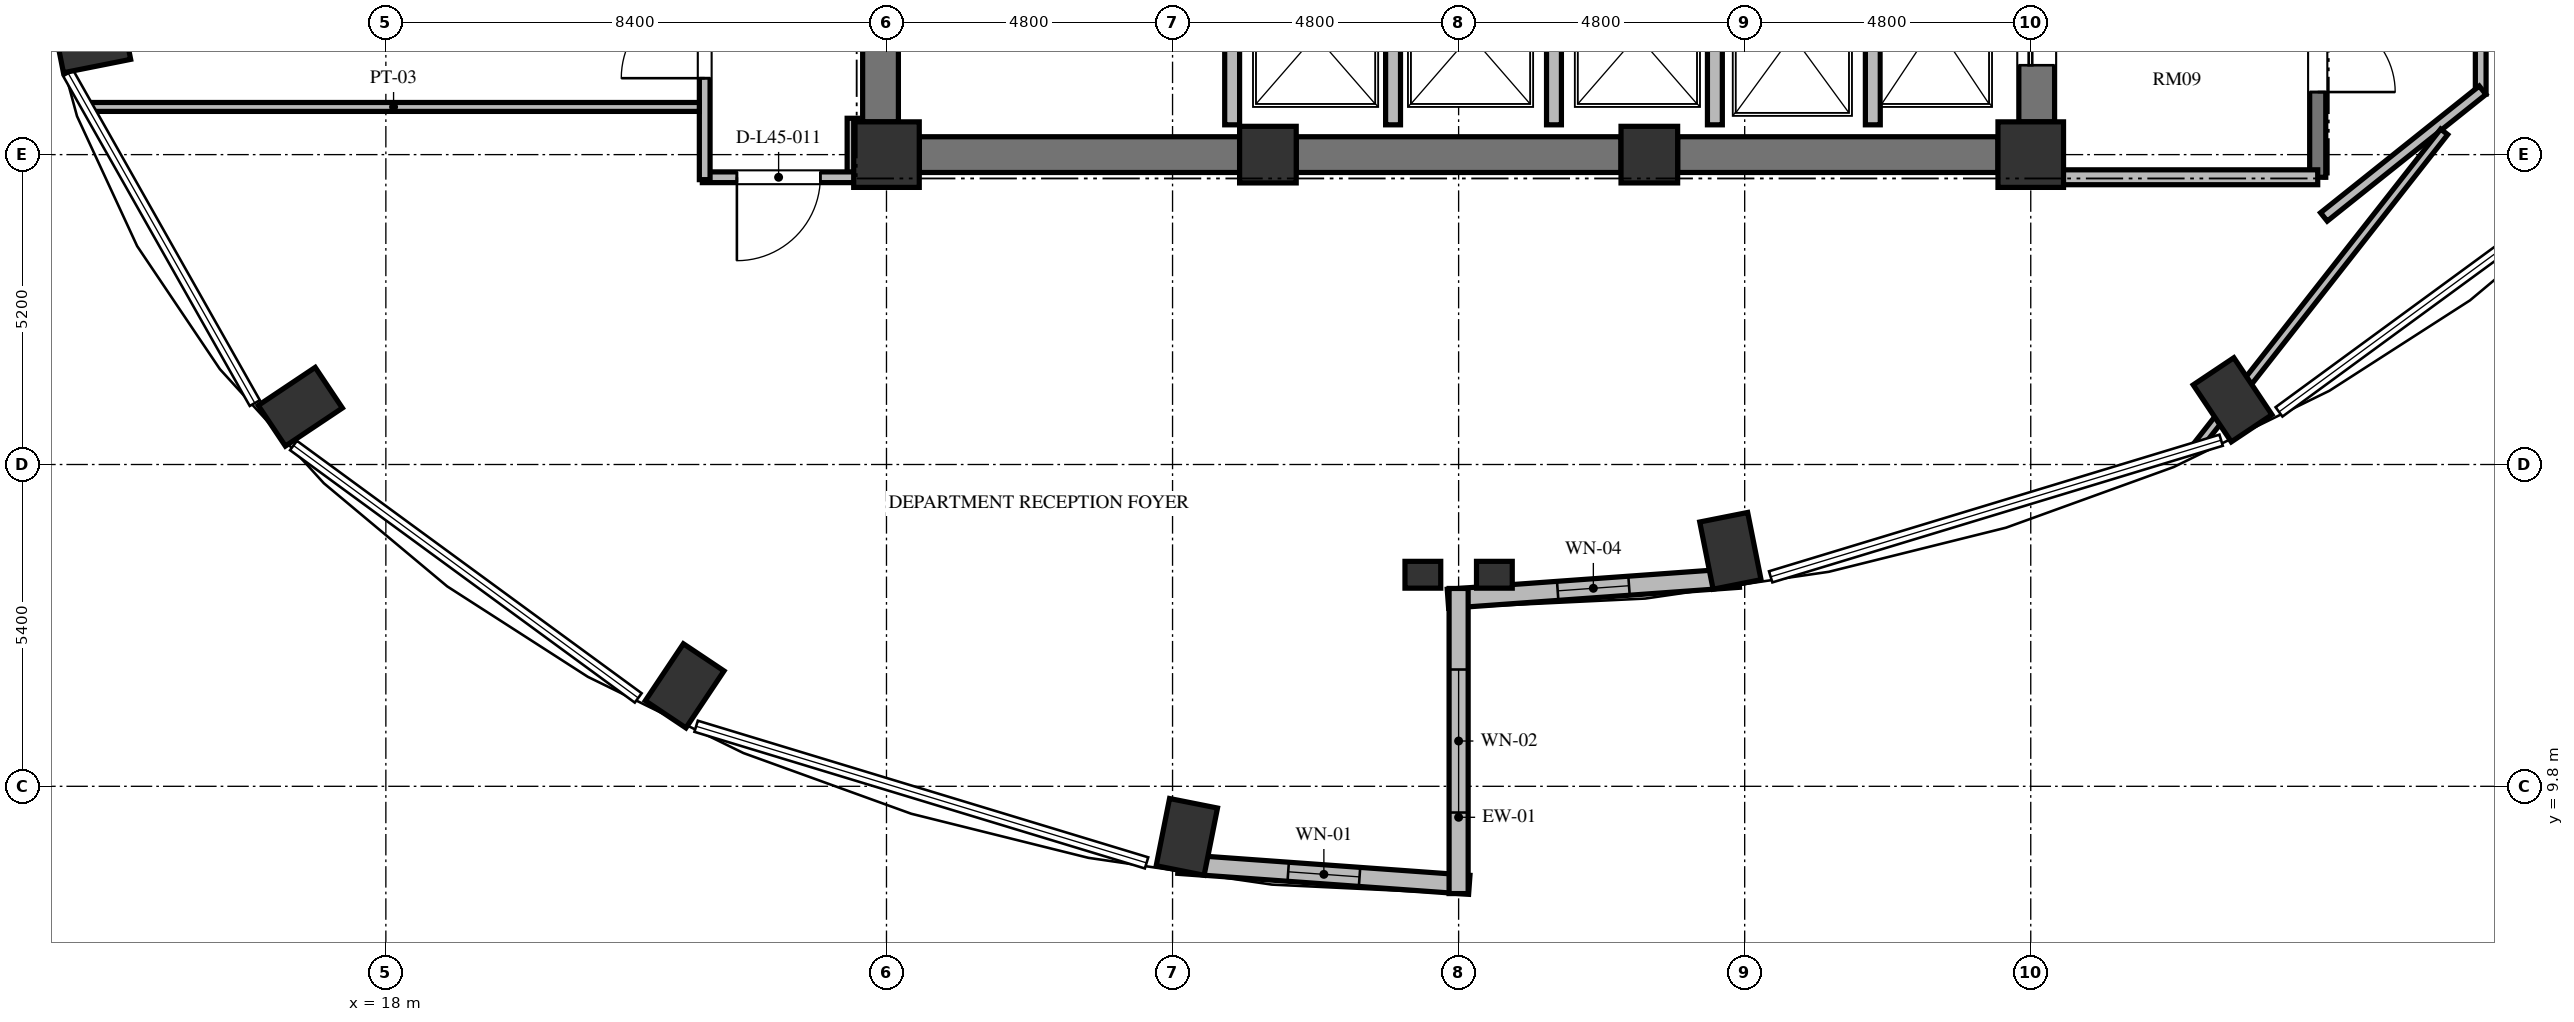
"""IFC4 building model, lengths in metres.
Left out: names, types, materials, properties, quantities, classifications, styles, units other than length and angle.
Written with IfcOpenShell. Run it as: python <this file> out.ifc"""

import sys

from ifc_helpers import new_model, si_unit, direction, frame, frame_2d, origin, origin_2d, place, context, subcontext, project, spatial, rectangle, extrude, element, fill, save


model = new_model("IFC4")
c1 = context("Model", 3, precision=1e-05, world=origin(), true_north=direction((0.0, 1.0)))
c2 = subcontext(c1, "Body", "Model", "MODEL_VIEW")
j1 = project(units=[si_unit("LENGTHUNIT", "METRE"), si_unit("PLANEANGLEUNIT", "RADIAN")], contexts=[c1])
p1 = place(None, origin())
s1 = spatial("IfcSite", under=j1, at=p1, CompositionType="ELEMENT")
p2 = place(p1, origin())
s2 = spatial("IfcBuilding", under=s1, at=p2, CompositionType="ELEMENT")
p3 = place(p2, frame((0.0, 0.0, 174.768)))
s3 = spatial("IfcBuildingStorey", under=s2, at=p3, CompositionType="ELEMENT", Elevation=174.768)
for number, where, z_axis, x_axis in (
    (1, (40.56, 13.751, 0.0), (0.0, 0.0, 1.0), (0.195, -0.981, 0.0)),
    (2, (48.987, 16.286, 0.0), (0.0, 0.0, 1.0), (0.556, -0.831, 0.0)),
    (3, (13.074, 22.288, 0.0), (0.0, 0.0, 1.0), (-0.981, -0.195, 0.0)),
    (4, (16.564, 16.169, 0.0), (0.0, 0.0, 1.0), (-0.831, -0.556, 0.0)),
    (5, (23.013, 11.486, 0.0), (0.0, 0.0, 1.0), (-0.556, -0.831, 0.0)),
    (6, (31.44, 8.951, 0.0), (0.0, 0.0, 1.0), (-0.195, -0.981, 0.0)),
):
    element("IfcColumn", number, at=place(p3, frame(where, z_axis=z_axis, x_axis=x_axis)), inside=s3, PredefinedType="COLUMN", context=c2, shape_type="SweptSolid", body=[
        extrude(rectangle(XDim=1.15, YDim=0.82, at=origin_2d()), origin(), (0.0, 0.0, 1.0), 3.648),
    ])
p4 = place(p3, frame((26.4, 20.4, 0.0), z_axis=(0.0, 0.0, 1.0), x_axis=(1.0, 0.0, 0.0)))
e7 = element("IfcColumn", 7, at=p4, inside=s3, PredefinedType="COLUMN", context=c2, shape_type="SweptSolid", body=[
    extrude(rectangle(XDim=1.1, YDim=1.1, at=origin_2d()), origin(), (0.0, 0.0, 1.0), 3.648),
])
for number, where, z_axis, x_axis in (
    (8, (32.8, 20.4, 0.0), (0.0, 0.0, 1.0), (1.0, 0.0, 0.0)),
    (9, (39.2, 20.4, 0.0), (0.0, 0.0, 1.0), (1.0, 0.0, 0.0)),
):
    element("IfcColumn", number, at=place(p3, frame(where, z_axis=z_axis, x_axis=x_axis)), inside=s3, PredefinedType="COLUMN", context=c2, shape_type="SweptSolid", body=[
        extrude(rectangle(XDim=0.95, YDim=0.95, at=origin_2d()), origin(), (0.0, 0.0, 1.0), 3.648),
    ])
p5 = place(p3, frame((45.6, 20.4, 0.0), z_axis=(0.0, 0.0, 1.0), x_axis=(1.0, 0.0, 0.0)))
e10 = element("IfcColumn", 10, at=p5, inside=s3, PredefinedType="COLUMN", context=c2, shape_type="SweptSolid", body=[
    extrude(rectangle(XDim=1.1, YDim=1.1, at=origin_2d()), origin(), (0.0, 0.0, 1.0), 3.648),
])
for number, where, z_axis, x_axis in (
    (11, (35.4, 13.35, 0.0), (0.0, 0.0, 1.0), (1.0, 0.0, 0.0)),
    (12, (36.6, 13.35, 0.0), (0.0, 0.0, 1.0), (1.0, 0.0, 0.0)),
):
    element("IfcColumn", number, at=place(p3, frame(where, z_axis=z_axis, x_axis=x_axis)), inside=s3, PredefinedType="PILASTER", context=c2, shape_type="SweptSolid", body=[
        extrude(rectangle(XDim=0.6, YDim=0.45, at=origin_2d()), origin(), (0.0, 0.0, 1.0), 3.648),
    ])
p6 = place(p3, frame((26.3, 20.95, 0.0), z_axis=(0.0, 0.0, 1.0), x_axis=(0.0, 1.0, 0.0)))
e13 = element("IfcWall", 13, at=p6, inside=s3, PredefinedType="SHEAR", context=c2, shape_type="SweptSolid", body=[
    extrude(rectangle(XDim=14.1, YDim=0.6, at=frame_2d((7.05, 0.0))), origin(), (0.0, 0.0, 1.0), 3.648),
])
p7 = place(p6, frame((6.5, 0.0, 0.0)))
e14 = element("IfcOpeningElement", 14, at=p7, cuts=e13, PredefinedType="OPENING", context=c2, shape_type="SweptSolid", body=[
    extrude(rectangle(XDim=1.2, YDim=2.15, at=frame_2d((0.6, 1.075))), frame((0.0, 0.31, 0.0), z_axis=(0.0, -1.0, 0.0), x_axis=(1.0, 0.0, 0.0)), (0.0, 0.0, 1.0), 0.62),
])
p8 = place(p6, frame((9.6, 0.0, 0.0)))
e15 = element("IfcOpeningElement", 15, at=p8, cuts=e13, PredefinedType="OPENING", context=c2, shape_type="SweptSolid", body=[
    extrude(rectangle(XDim=1.3, YDim=2.2, at=frame_2d((0.65, 1.1))), frame((0.0, 0.31, 0.0), z_axis=(0.0, -1.0, 0.0), x_axis=(1.0, 0.0, 0.0)), (0.0, 0.0, 1.0), 0.62),
])
p9 = place(p6, frame((3.26, 0.0, 0.0)))
e16 = element("IfcOpeningElement", 16, at=p9, cuts=e13, PredefinedType="OPENING", context=c2, shape_type="SweptSolid", body=[
    extrude(rectangle(XDim=1.3, YDim=2.2, at=frame_2d((0.65, 1.1))), frame((0.0, 0.31, 0.0), z_axis=(0.0, -1.0, 0.0), x_axis=(1.0, 0.0, 0.0)), (0.0, 0.0, 1.0), 0.62),
])
p10 = place(p3, frame((45.7, 20.95, 0.0), z_axis=(0.0, 0.0, 1.0), x_axis=(0.0, 1.0, 0.0)))
e17 = element("IfcWall", 17, at=p10, inside=s3, PredefinedType="SHEAR", context=c2, shape_type="SweptSolid", body=[
    extrude(rectangle(XDim=14.1, YDim=0.6, at=frame_2d((7.05, 0.0))), origin(), (0.0, 0.0, 1.0), 3.648),
])
p11 = place(p10, frame((11.75, 0.0, 0.0)))
e18 = element("IfcOpeningElement", 18, at=p11, cuts=e17, PredefinedType="OPENING", context=c2, shape_type="SweptSolid", body=[
    extrude(rectangle(XDim=1.4, YDim=2.3, at=frame_2d((0.7, 1.15))), frame((0.0, 0.31, 0.0), z_axis=(0.0, -1.0, 0.0), x_axis=(1.0, 0.0, 0.0)), (0.0, 0.0, 1.0), 0.62),
])
p12 = place(p10, frame((0.95, 0.0, 0.0)))
e19 = element("IfcOpeningElement", 19, at=p12, cuts=e17, PredefinedType="OPENING", context=c2, shape_type="SweptSolid", body=[
    extrude(rectangle(XDim=1.4, YDim=2.3, at=frame_2d((0.7, 1.15))), frame((0.0, 0.31, 0.0), z_axis=(0.0, -1.0, 0.0), x_axis=(1.0, 0.0, 0.0)), (0.0, 0.0, 1.0), 0.62),
])
p13 = place(p3, frame((26.95, 20.4, 0.0), z_axis=(0.0, 0.0, 1.0), x_axis=(1.0, 0.0, 0.0)))
e20 = element("IfcWall", 20, at=p13, inside=s3, PredefinedType="SHEAR", context=c2, shape_type="SweptSolid", body=[
    extrude(rectangle(XDim=5.375, YDim=0.6, at=frame_2d((2.688, 0.0))), origin(), (0.0, 0.0, 1.0), 3.648),
])
p14 = place(p3, frame((33.275, 20.4, 0.0), z_axis=(0.0, 0.0, 1.0), x_axis=(1.0, 0.0, 0.0)))
e21 = element("IfcWall", 21, at=p14, inside=s3, PredefinedType="SHEAR", context=c2, shape_type="SweptSolid", body=[
    extrude(rectangle(XDim=5.45, YDim=0.6, at=frame_2d((2.725, 0.0))), origin(), (0.0, 0.0, 1.0), 3.648),
])
p15 = place(p3, frame((39.675, 20.4, 0.0), z_axis=(0.0, 0.0, 1.0), x_axis=(1.0, 0.0, 0.0)))
e22 = element("IfcWall", 22, at=p15, inside=s3, PredefinedType="SHEAR", context=c2, shape_type="SweptSolid", body=[
    extrude(rectangle(XDim=5.375, YDim=0.6, at=frame_2d((2.688, 0.0))), origin(), (0.0, 0.0, 1.0), 3.648),
])
p16 = place(p3, frame((35.821, 12.947, 0.0), z_axis=(0.0, 0.0, 1.0), x_axis=(0.997415460462, 0.071849838072, 0.0)))
e23 = element("IfcWall", 23, at=p16, inside=s3, PredefinedType="SOLIDWALL", context=c2, shape_type="SweptSolid", body=[
    extrude(rectangle(XDim=4.893, YDim=0.32, at=frame_2d((2.447, 0.0))), origin(), (0.0, 0.0, 1.0), 3.428),
])
p17 = place(p16, frame((1.846, 0.0, 0.85)))
e24 = element("IfcOpeningElement", 24, at=p17, cuts=e23, PredefinedType="OPENING", context=c2, shape_type="SweptSolid", body=[
    extrude(rectangle(XDim=1.2, YDim=1.8, at=frame_2d((0.6, 0.9))), frame((0.0, 0.17, 0.0), z_axis=(0.0, -1.0, 0.0), x_axis=(1.0, 0.0, 0.0)), (0.0, 0.0, 1.0), 0.34),
])
p18 = place(p3, frame((31.299, 8.499, 0.0), z_axis=(0.0, 0.0, 1.0), x_axis=(0.997415202861, -0.071853413984, 0.0)))
e25 = element("IfcWall", 25, at=p18, inside=s3, PredefinedType="SOLIDWALL", context=c2, shape_type="SweptSolid", body=[
    extrude(rectangle(XDim=4.893, YDim=0.32, at=frame_2d((2.446, 0.0))), origin(), (0.0, 0.0, 1.0), 3.428),
])
p19 = place(p18, frame((1.846, 0.0, 0.85)))
e26 = element("IfcOpeningElement", 26, at=p19, cuts=e25, PredefinedType="OPENING", context=c2, shape_type="SweptSolid", body=[
    extrude(rectangle(XDim=1.2, YDim=2.2, at=frame_2d((0.6, 1.1))), frame((0.0, 0.17, 0.0), z_axis=(0.0, -1.0, 0.0), x_axis=(1.0, 0.0, 0.0)), (0.0, 0.0, 1.0), 0.34),
])
p20 = place(p3, frame((36.0, 8.0, 0.0), z_axis=(0.0, 0.0, 1.0), x_axis=(0.0, 1.0, 0.0)))
e27 = element("IfcWall", 27, at=p20, inside=s3, PredefinedType="SOLIDWALL", context=c2, shape_type="SweptSolid", body=[
    extrude(rectangle(XDim=5.12, YDim=0.32, at=frame_2d((2.56, 0.0))), origin(), (0.0, 0.0, 1.0), 3.428),
])
p21 = place(p20, frame((1.36, 0.0, 0.84)))
e28 = element("IfcOpeningElement", 28, at=p21, cuts=e27, PredefinedType="OPENING", context=c2, shape_type="SweptSolid", body=[
    extrude(rectangle(XDim=2.4, YDim=2.04, at=frame_2d((1.2, 1.02))), frame((0.0, 0.17, 0.0), z_axis=(0.0, -1.0, 0.0), x_axis=(1.0, 0.0, 0.0)), (0.0, 0.0, 1.0), 0.34),
])
p22 = place(p3, frame((42.95, 20.9, 0.0), z_axis=(0.0, 0.0, 1.0), x_axis=(0.0, 1.0, 0.0)))
e29 = element("IfcWall", 29, at=p22, inside=s3, PredefinedType="SOLIDWALL", context=c2, shape_type="SweptSolid", body=[
    extrude(rectangle(XDim=3.2, YDim=0.25, at=frame_2d((1.6, 0.0))), origin(), (0.0, 0.0, 1.0), 3.428),
])
for number, where, z_axis, x_axis in (
    (30, (32.2, 20.9, 0.0), (0.0, 0.0, 1.0), (0.0, 1.0, 0.0)),
    (31, (34.9, 20.9, 0.0), (0.0, 0.0, 1.0), (0.0, 1.0, 0.0)),
    (32, (37.6, 20.9, 0.0), (0.0, 0.0, 1.0), (0.0, 1.0, 0.0)),
    (33, (40.3, 20.9, 0.0), (0.0, 0.0, 1.0), (0.0, 1.0, 0.0)),
):
    element("IfcWall", number, at=place(p3, frame(where, z_axis=z_axis, x_axis=x_axis)), inside=s3, PredefinedType="SOLIDWALL", context=c2, shape_type="SweptSolid", body=[
        extrude(rectangle(XDim=2.8, YDim=0.25, at=frame_2d((1.4, 0.0))), origin(), (0.0, 0.0, 1.0), 3.428),
    ])
p23 = place(p3, frame((50.415, 35.845, 0.0), z_axis=(0.0, 0.0, 1.0), x_axis=(0.0, -1.0, 0.0)))
e34 = element("IfcWall", 34, at=p23, inside=s3, PredefinedType="SHEAR", context=c2, shape_type="SweptSolid", body=[
    extrude(rectangle(XDim=15.825, YDim=0.27, at=frame_2d((7.913, 0.0))), origin(), (0.0, 0.0, 1.0), 3.648),
])
p24 = place(p23, frame((4.445, 0.0, 0.0)))
e35 = element("IfcOpeningElement", 35, at=p24, cuts=e34, PredefinedType="OPENING", context=c2, shape_type="SweptSolid", body=[
    extrude(rectangle(XDim=1.2, YDim=2.15, at=frame_2d((0.6, 1.075))), frame((0.0, 0.145, 0.0), z_axis=(0.0, -1.0, 0.0), x_axis=(1.0, 0.0, 0.0)), (0.0, 0.0, 1.0), 0.29),
])
p25 = place(p23, frame((1.295, 0.0, 0.0)))
e36 = element("IfcOpeningElement", 36, at=p25, cuts=e34, PredefinedType="OPENING", context=c2, shape_type="SweptSolid", body=[
    extrude(rectangle(XDim=1.3, YDim=2.2, at=frame_2d((0.65, 1.1))), frame((0.0, 0.145, 0.0), z_axis=(0.0, -1.0, 0.0), x_axis=(1.0, 0.0, 0.0)), (0.0, 0.0, 1.0), 0.29),
])
p26 = place(p23, frame((13.095, 0.0, 0.0)))
e37 = element("IfcOpeningElement", 37, at=p26, cuts=e34, PredefinedType="OPENING", context=c2, shape_type="SweptSolid", body=[
    extrude(rectangle(XDim=1.3, YDim=2.2, at=frame_2d((0.65, 1.1))), frame((0.0, 0.145, 0.0), z_axis=(0.0, -1.0, 0.0), x_axis=(1.0, 0.0, 0.0)), (0.0, 0.0, 1.0), 0.29),
])
p27 = place(p3, frame((45.7, 20.02, 0.0), z_axis=(0.0, 0.0, 1.0), x_axis=(1.0, 0.0, 0.0)))
e38 = element("IfcWall", 38, at=p27, inside=s3, PredefinedType="SOLIDWALL", context=c2, shape_type="SweptSolid", body=[
    extrude(rectangle(XDim=4.715, YDim=0.25, at=frame_2d((2.357, 0.0))), origin(), (0.0, 0.0, 1.0), 3.428),
])
p28 = place(p3, frame((53.15, 38.79, 0.0), z_axis=(0.0, 0.0, 1.0), x_axis=(0.0, -1.0, 0.0)))
e39 = element("IfcWall", 39, at=p28, inside=s3, PredefinedType="PARTITIONING", context=c2, shape_type="SweptSolid", body=[
    extrude(rectangle(XDim=17.374, YDim=0.18, at=frame_2d((8.687, 0.0))), origin(), (0.0, 0.0, 1.0), 3.428),
])
p29 = place(p28, frame((8.162, 0.0, 0.0)))
e40 = element("IfcOpeningElement", 40, at=p29, cuts=e39, PredefinedType="OPENING", context=c2, shape_type="SweptSolid", body=[
    extrude(rectangle(XDim=1.05, YDim=2.15, at=frame_2d((0.525, 1.075))), frame((0.0, 0.1, 0.0), z_axis=(0.0, -1.0, 0.0), x_axis=(1.0, 0.0, 0.0)), (0.0, 0.0, 1.0), 0.2),
])
p30 = place(p3, frame((53.181, 21.481, 0.0), z_axis=(0.0, 0.0, 1.0), x_axis=(-0.781420737726, -0.624004511724, 0.0)))
e41 = element("IfcWall", 41, at=p30, inside=s3, PredefinedType="PARTITIONING", context=c2, shape_type="SweptSolid", body=[
    extrude(rectangle(XDim=3.407, YDim=0.18, at=frame_2d((1.704, 0.0))), origin(), (0.0, 0.0, 1.0), 3.428),
])
p31 = place(p3, frame((25.83, 21.01, 0.0), z_axis=(0.0, 0.0, 1.0), x_axis=(0.0, -1.0, 0.0)))
e42 = element("IfcWall", 42, at=p31, inside=s3, PredefinedType="PARTITIONING", context=c2, shape_type="SweptSolid", body=[
    extrude(rectangle(XDim=1.03, YDim=0.18, at=frame_2d((0.515, 0.0))), origin(), (0.0, 0.0, 1.0), 3.428),
])
p32 = place(p3, frame((25.87, 20.02, 0.0), z_axis=(0.0, 0.0, 1.0), x_axis=(-1.0, 0.0, 0.0)))
e43 = element("IfcWall", 43, at=p32, inside=s3, PredefinedType="PARTITIONING", context=c2, shape_type="SweptSolid", body=[
    extrude(rectangle(XDim=2.56, YDim=0.18, at=frame_2d((1.28, 0.0))), origin(), (0.0, 0.0, 1.0), 3.428),
])
p33 = place(p32, frame((0.58, 0.0, 0.0)))
e44 = element("IfcOpeningElement", 44, at=p33, cuts=e43, PredefinedType="OPENING", context=c2, shape_type="SweptSolid", body=[
    extrude(rectangle(XDim=1.4, YDim=2.2, at=frame_2d((0.7, 1.1))), frame((0.0, 0.1, 0.0), z_axis=(0.0, -1.0, 0.0), x_axis=(1.0, 0.0, 0.0)), (0.0, 0.0, 1.0), 0.2),
])
p34 = place(p3, frame((23.35, 19.98, 0.0), z_axis=(0.0, 0.0, 1.0), x_axis=(0.0, 1.0, 0.0)))
e45 = element("IfcWall", 45, at=p34, inside=s3, PredefinedType="PARTITIONING", context=c2, shape_type="SweptSolid", body=[
    extrude(rectangle(XDim=5.06, YDim=0.18, at=frame_2d((2.53, 0.0))), origin(), (0.0, 0.0, 1.0), 3.428),
])
p35 = place(p34, frame((1.702, 0.0, 0.0)))
e46 = element("IfcOpeningElement", 46, at=p35, cuts=e45, PredefinedType="OPENING", context=c2, shape_type="SweptSolid", body=[
    extrude(rectangle(XDim=1.4, YDim=2.2, at=frame_2d((0.7, 1.1))), frame((0.0, 0.1, 0.0), z_axis=(0.0, -1.0, 0.0), x_axis=(1.0, 0.0, 0.0)), (0.0, 0.0, 1.0), 0.2),
])
p36 = place(p3, frame((12.999, 21.2, 0.0), z_axis=(0.0, 0.0, 1.0), x_axis=(1.0, 0.0, 0.0)))
e47 = element("IfcWall", 47, at=p36, inside=s3, PredefinedType="PARTITIONING", context=c2, shape_type="SweptSolid", body=[
    extrude(rectangle(XDim=10.261, YDim=0.15, at=frame_2d((5.131, 0.0))), origin(), (0.0, 0.0, 1.0), 2.863),
])
p37 = place(p3, frame((52.537, 20.783, 0.0), z_axis=(0.0, 0.0, 1.0), x_axis=(-0.617570357244, -0.786515641201, 0.0)))
e48 = element("IfcWall", 48, at=p37, inside=s3, PredefinedType="PARTITIONING", context=c2, shape_type="SweptSolid", body=[
    extrude(rectangle(XDim=6.74, YDim=0.15, at=frame_2d((3.37, 0.0))), origin(), (0.0, 0.0, 1.0), 2.863),
])
p38 = place(p17, origin())
e49 = element("IfcWindow", 49, at=p38, inside=s3, PartitioningType="SINGLE_PANEL", PredefinedType="WINDOW", context=c2, shape_type="SweptSolid", body=[
    extrude(rectangle(XDim=1.2, YDim=1.8, at=frame_2d((0.6, 0.9))), frame((0.0, 0.03, 0.0), z_axis=(0.0, -1.0, 0.0), x_axis=(1.0, 0.0, 0.0)), (0.0, 0.0, 1.0), 0.06),
])
fill(e24, e49)
p39 = place(p19, origin())
e50 = element("IfcWindow", 50, at=p39, inside=s3, PartitioningType="SINGLE_PANEL", PredefinedType="WINDOW", context=c2, shape_type="SweptSolid", body=[
    extrude(rectangle(XDim=1.2, YDim=2.2, at=frame_2d((0.6, 1.1))), frame((0.0, 0.03, 0.0), z_axis=(0.0, -1.0, 0.0), x_axis=(1.0, 0.0, 0.0)), (0.0, 0.0, 1.0), 0.06),
])
fill(e26, e50)
p40 = place(p21, origin())
e51 = element("IfcWindow", 51, at=p40, inside=s3, PartitioningType="SINGLE_PANEL", PredefinedType="WINDOW", context=c2, shape_type="SweptSolid", body=[
    extrude(rectangle(XDim=2.4, YDim=2.04, at=frame_2d((1.2, 1.02))), frame((0.0, 0.03, 0.0), z_axis=(0.0, -1.0, 0.0), x_axis=(1.0, 0.0, 0.0)), (0.0, 0.0, 1.0), 0.06),
])
fill(e28, e51)
p41 = place(p12, origin())
e52 = element("IfcDoor", 52, at=p41, inside=s3, OperationType="SLIDING_TO_LEFT", PredefinedType="DOOR", context=c2, shape_type="SweptSolid", body=[
    extrude(rectangle(XDim=1.4, YDim=2.3, at=frame_2d((0.7, 1.15))), frame((0.0, 0.025, 0.0), z_axis=(0.0, -1.0, 0.0), x_axis=(1.0, 0.0, 0.0)), (0.0, 0.0, 1.0), 0.05),
])
fill(e19, e52)
p42 = place(p26, origin())
e53 = element("IfcDoor", 53, at=p42, inside=s3, OperationType="SINGLE_SWING_RIGHT", PredefinedType="DOOR", context=c2, shape_type="SweptSolid", body=[
    extrude(rectangle(XDim=1.3, YDim=2.2, at=frame_2d((0.65, 1.1))), frame((0.0, 0.025, 0.0), z_axis=(0.0, -1.0, 0.0), x_axis=(1.0, 0.0, 0.0)), (0.0, 0.0, 1.0), 0.05),
])
fill(e37, e53)
p43 = place(p35, origin())
e54 = element("IfcDoor", 54, at=p43, inside=s3, OperationType="SINGLE_SWING_LEFT", PredefinedType="DOOR", context=c2, shape_type="SweptSolid", body=[
    extrude(rectangle(XDim=1.4, YDim=2.2, at=frame_2d((0.7, 1.1))), frame((0.0, 0.025, 0.0), z_axis=(0.0, -1.0, 0.0), x_axis=(1.0, 0.0, 0.0)), (0.0, 0.0, 1.0), 0.05),
])
fill(e46, e54)
p44 = place(p33, origin())
e55 = element("IfcDoor", 55, at=p44, inside=s3, OperationType="SINGLE_SWING_RIGHT", PredefinedType="DOOR", context=c2, shape_type="SweptSolid", body=[
    extrude(rectangle(XDim=1.4, YDim=2.2, at=frame_2d((0.7, 1.1))), frame((0.0, 0.025, 0.0), z_axis=(0.0, -1.0, 0.0), x_axis=(1.0, 0.0, 0.0)), (0.0, 0.0, 1.0), 0.05),
])
fill(e44, e55)
save(model, sys.argv[1])
